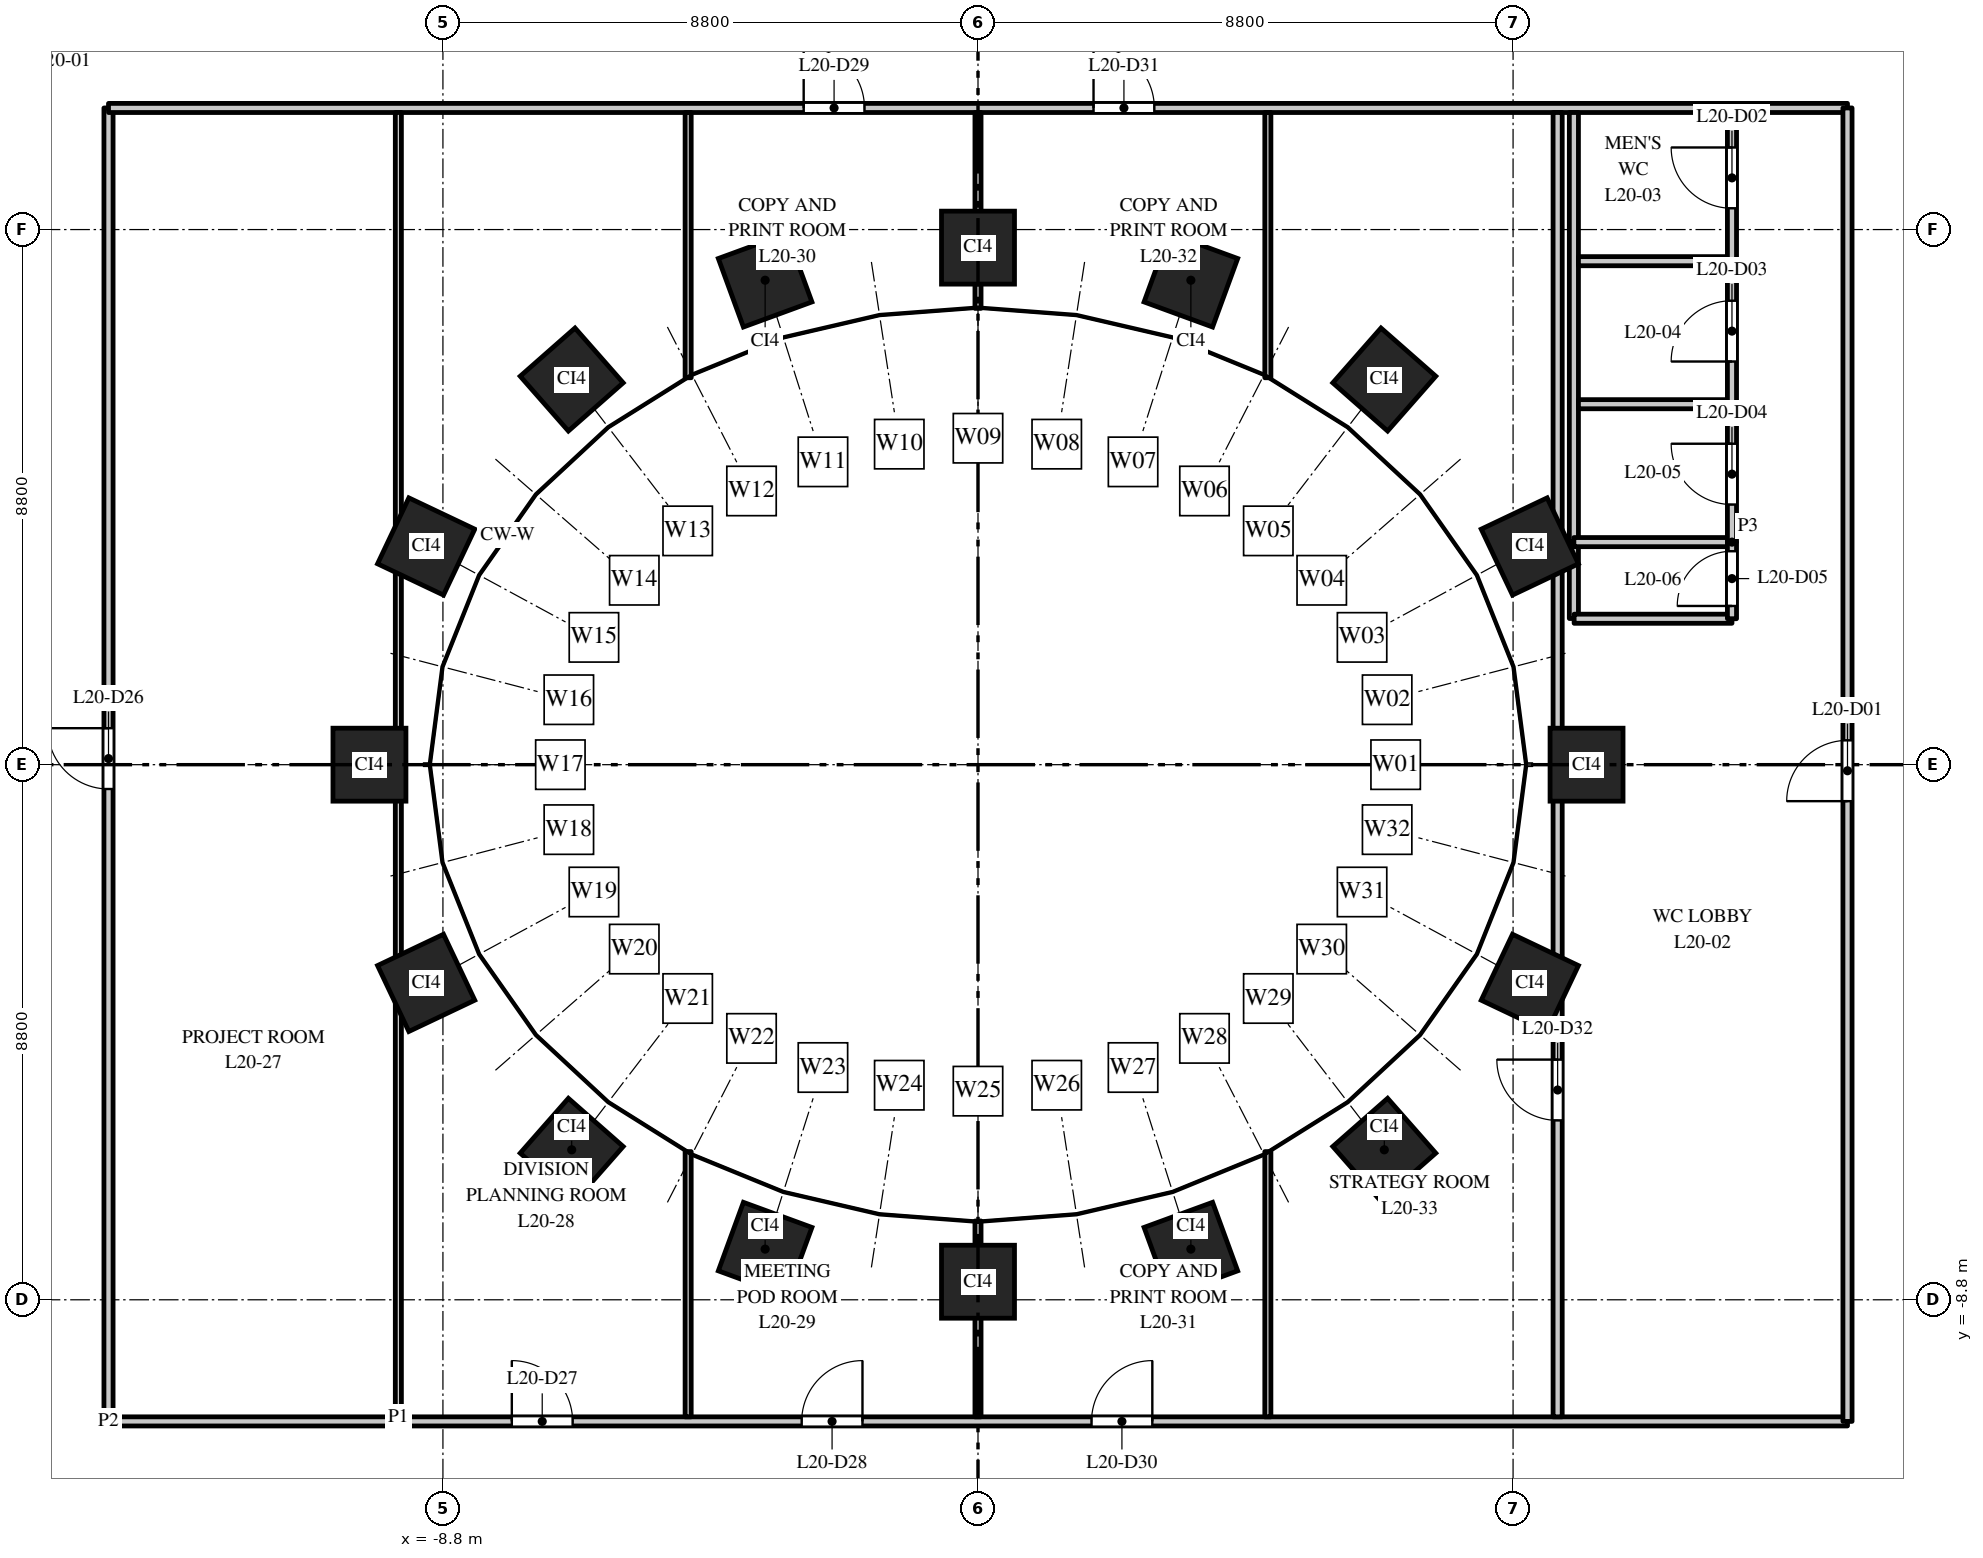
"""IFC4 building model, lengths in metres.
Left out: names, types, materials, properties, quantities, classifications, styles, units other than length and angle.
Written with IfcOpenShell. Run it as: python <this file> out.ifc"""

import sys

from ifc_helpers import new_model, si_unit, direction, frame, frame_2d, origin, origin_2d, place, context, subcontext, project, spatial, rectangle, extrude, element, fill, save


model = new_model("IFC4")
c1 = context("Model", 3, precision=1e-05, world=origin(), true_north=direction((0.0, 1.0)))
c2 = subcontext(c1, "Body", "Model", "MODEL_VIEW")
j1 = project(units=[si_unit("LENGTHUNIT", "METRE"), si_unit("PLANEANGLEUNIT", "RADIAN")], contexts=[c1])
p1 = place(None, origin())
s1 = spatial("IfcSite", under=j1, at=p1, CompositionType="ELEMENT")
p2 = place(p1, origin())
s2 = spatial("IfcBuilding", under=s1, at=p2, CompositionType="ELEMENT")
p3 = place(p2, frame((0.0, 0.0, 92.0)))
s3 = spatial("IfcBuildingStorey", under=s2, at=p3, CompositionType="ELEMENT", Elevation=92.0)
for number, where, z_axis, x_axis in (
    (1, (10.008, 0.0, 0.0), (0.0, 0.0, 1.0), (0.0, 1.0, 0.0)),
    (2, (9.076, 3.588, 0.0), (0.0, 0.0, 1.0), (-0.429, 0.903, 0.0)),
    (3, (6.682, 6.334, 0.0), (0.0, 0.0, 1.0), (-0.751, 0.66, 0.0)),
    (4, (3.501, 7.967, 0.0), (0.0, 0.0, 1.0), (-0.939, 0.344, 0.0)),
    (5, (0.0, 8.503, 0.0), (0.0, 0.0, 1.0), (-1.0, 0.0, 0.0)),
    (6, (-3.501, 7.967, 0.0), (0.0, 0.0, 1.0), (-0.939, -0.344, 0.0)),
    (7, (-6.682, 6.334, 0.0), (0.0, 0.0, 1.0), (-0.751, -0.66, 0.0)),
    (8, (-9.076, 3.588, 0.0), (0.0, 0.0, 1.0), (-0.429, -0.903, 0.0)),
    (9, (-10.008, 0.0, 0.0), (0.0, 0.0, 1.0), (0.0, -1.0, 0.0)),
    (10, (-9.076, -3.588, 0.0), (0.0, 0.0, 1.0), (0.429, -0.903, 0.0)),
    (11, (-6.682, -6.334, 0.0), (0.0, 0.0, 1.0), (0.751, -0.66, 0.0)),
    (12, (-3.501, -7.967, 0.0), (0.0, 0.0, 1.0), (0.939, -0.344, 0.0)),
    (13, (0.0, -8.503, 0.0), (0.0, 0.0, 1.0), (1.0, 0.0, 0.0)),
    (14, (3.501, -7.967, 0.0), (0.0, 0.0, 1.0), (0.939, 0.344, 0.0)),
    (15, (6.682, -6.334, 0.0), (0.0, 0.0, 1.0), (0.751, 0.66, 0.0)),
    (16, (9.076, -3.588, 0.0), (0.0, 0.0, 1.0), (0.429, 0.903, 0.0)),
):
    element("IfcColumn", number, at=place(p3, frame(where, z_axis=z_axis, x_axis=x_axis)), inside=s3, PredefinedType="COLUMN", context=c2, shape_type="SweptSolid", body=[
        extrude(rectangle(XDim=1.2, YDim=1.2, at=origin_2d()), origin(), (0.0, 0.0, 1.0), 4.0),
    ])
p4 = place(p3, frame((-14.3, -10.8, 0.0), z_axis=(0.0, 0.0, 1.0), x_axis=(0.0, 1.0, 0.0)))
e17 = element("IfcWall", 17, at=p4, inside=s3, PredefinedType="PARTITIONING", context=c2, shape_type="SweptSolid", body=[
    extrude(rectangle(XDim=21.6, YDim=0.15, at=frame_2d((10.8, 0.0))), origin(), (0.0, 0.0, 1.0), 2.75),
])
p5 = place(p4, frame((10.4, 0.0, 0.0)))
e18 = element("IfcOpeningElement", 18, at=p5, cuts=e17, PredefinedType="OPENING", context=c2, shape_type="SweptSolid", body=[
    extrude(rectangle(XDim=1.0, YDim=2.1, at=frame_2d((0.5, 1.05))), frame((0.0, 0.085, 0.0), z_axis=(0.0, -1.0, 0.0), x_axis=(1.0, 0.0, 0.0)), (0.0, 0.0, 1.0), 0.17),
])
p6 = place(p3, frame((-14.3, -10.8, 0.0), z_axis=(0.0, 0.0, 1.0), x_axis=(1.0, 0.0, 0.0)))
e19 = element("IfcWall", 19, at=p6, inside=s3, PredefinedType="PARTITIONING", context=c2, shape_type="SweptSolid", body=[
    extrude(rectangle(XDim=28.6, YDim=0.15, at=frame_2d((14.3, 0.0))), origin(), (0.0, 0.0, 1.0), 2.85),
])
p7 = place(p6, frame((6.633, 0.0, 0.0)))
e20 = element("IfcOpeningElement", 20, at=p7, cuts=e19, PredefinedType="OPENING", context=c2, shape_type="SweptSolid", body=[
    extrude(rectangle(XDim=1.0, YDim=2.1, at=frame_2d((0.5, 1.05))), frame((0.0, 0.085, 0.0), z_axis=(0.0, -1.0, 0.0), x_axis=(1.0, 0.0, 0.0)), (0.0, 0.0, 1.0), 0.17),
])
p8 = place(p6, frame((11.4, 0.0, 0.0)))
e21 = element("IfcOpeningElement", 21, at=p8, cuts=e19, PredefinedType="OPENING", context=c2, shape_type="SweptSolid", body=[
    extrude(rectangle(XDim=1.0, YDim=2.1, at=frame_2d((0.5, 1.05))), frame((0.0, 0.085, 0.0), z_axis=(0.0, -1.0, 0.0), x_axis=(1.0, 0.0, 0.0)), (0.0, 0.0, 1.0), 0.17),
])
p9 = place(p6, frame((16.167, 0.0, 0.0)))
e22 = element("IfcOpeningElement", 22, at=p9, cuts=e19, PredefinedType="OPENING", context=c2, shape_type="SweptSolid", body=[
    extrude(rectangle(XDim=1.0, YDim=2.1, at=frame_2d((0.5, 1.05))), frame((0.0, 0.085, 0.0), z_axis=(0.0, -1.0, 0.0), x_axis=(1.0, 0.0, 0.0)), (0.0, 0.0, 1.0), 0.17),
])
p10 = place(p3, frame((-14.3, 10.8, 0.0), z_axis=(0.0, 0.0, 1.0), x_axis=(1.0, 0.0, 0.0)))
e23 = element("IfcWall", 23, at=p10, inside=s3, PredefinedType="PARTITIONING", context=c2, shape_type="SweptSolid", body=[
    extrude(rectangle(XDim=28.6, YDim=0.15, at=frame_2d((14.3, 0.0))), origin(), (0.0, 0.0, 1.0), 2.85),
])
p11 = place(p10, frame((11.433, 0.0, 0.0)))
e24 = element("IfcOpeningElement", 24, at=p11, cuts=e23, PredefinedType="OPENING", context=c2, shape_type="SweptSolid", body=[
    extrude(rectangle(XDim=1.0, YDim=2.1, at=frame_2d((0.5, 1.05))), frame((0.0, 0.085, 0.0), z_axis=(0.0, -1.0, 0.0), x_axis=(1.0, 0.0, 0.0)), (0.0, 0.0, 1.0), 0.17),
])
p12 = place(p10, frame((16.2, 0.0, 0.0)))
e25 = element("IfcOpeningElement", 25, at=p12, cuts=e23, PredefinedType="OPENING", context=c2, shape_type="SweptSolid", body=[
    extrude(rectangle(XDim=1.0, YDim=2.1, at=frame_2d((0.5, 1.05))), frame((0.0, 0.085, 0.0), z_axis=(0.0, -1.0, 0.0), x_axis=(1.0, 0.0, 0.0)), (0.0, 0.0, 1.0), 0.17),
])
p13 = place(p3, frame((-9.533, -10.725, 0.0), z_axis=(0.0, 0.0, 1.0), x_axis=(0.0, 1.0, 0.0)))
e26 = element("IfcWall", 26, at=p13, inside=s3, PredefinedType="PARTITIONING", context=c2, shape_type="SweptSolid", body=[
    extrude(rectangle(XDim=21.45, YDim=0.1, at=frame_2d((10.725, 0.0))), origin(), (0.0, 0.0, 1.0), 2.75),
])
for number, where, z_axis, x_axis in (
    (27, (-4.767, -10.725, 0.0), (0.0, 0.0, 1.0), (0.0, 1.0, 0.0)),
    (28, (-4.767, 6.363, 0.0), (0.0, 0.0, 1.0), (0.0, 1.0, 0.0)),
):
    element("IfcWall", number, at=place(p3, frame(where, z_axis=z_axis, x_axis=x_axis)), inside=s3, PredefinedType="PARTITIONING", context=c2, shape_type="SweptSolid", body=[
        extrude(rectangle(XDim=4.362, YDim=0.1, at=frame_2d((2.181, 0.0))), origin(), (0.0, 0.0, 1.0), 2.9),
    ])
for number, where, z_axis, x_axis in (
    (29, (0.0, -10.725, 0.0), (0.0, 0.0, 1.0), (0.0, 1.0, 0.0)),
    (30, (0.0, 7.504, 0.0), (0.0, 0.0, 1.0), (0.0, 1.0, 0.0)),
):
    element("IfcWall", number, at=place(p3, frame(where, z_axis=z_axis, x_axis=x_axis)), inside=s3, PredefinedType="PARTITIONING", context=c2, shape_type="SweptSolid", body=[
        extrude(rectangle(XDim=3.221, YDim=0.1, at=frame_2d((1.611, 0.0))), origin(), (0.0, 0.0, 1.0), 3.7),
    ])
for number, where, z_axis, x_axis in (
    (31, (4.767, -10.725, 0.0), (0.0, 0.0, 1.0), (0.0, 1.0, 0.0)),
    (32, (4.767, 6.363, 0.0), (0.0, 0.0, 1.0), (0.0, 1.0, 0.0)),
):
    element("IfcWall", number, at=place(p3, frame(where, z_axis=z_axis, x_axis=x_axis)), inside=s3, PredefinedType="PARTITIONING", context=c2, shape_type="SweptSolid", body=[
        extrude(rectangle(XDim=4.362, YDim=0.1, at=frame_2d((2.181, 0.0))), origin(), (0.0, 0.0, 1.0), 2.85),
    ])
p14 = place(p3, frame((9.533, -10.725, 0.0), z_axis=(0.0, 0.0, 1.0), x_axis=(0.0, 1.0, 0.0)))
e33 = element("IfcWall", 33, at=p14, inside=s3, PredefinedType="PARTITIONING", context=c2, shape_type="SweptSolid", body=[
    extrude(rectangle(XDim=21.45, YDim=0.15, at=frame_2d((10.725, 0.0))), origin(), (0.0, 0.0, 1.0), 2.75),
])
p15 = place(p14, frame((4.875, 0.0, 0.0)))
e34 = element("IfcOpeningElement", 34, at=p15, cuts=e33, PredefinedType="OPENING", context=c2, shape_type="SweptSolid", body=[
    extrude(rectangle(XDim=1.0, YDim=2.1, at=frame_2d((0.5, 1.05))), frame((0.0, 0.085, 0.0), z_axis=(0.0, -1.0, 0.0), x_axis=(1.0, 0.0, 0.0)), (0.0, 0.0, 1.0), 0.17),
])
p16 = place(p3, frame((9.8, 2.404, 0.0), z_axis=(0.0, 0.0, 1.0), x_axis=(0.0, 1.0, 0.0)))
e35 = element("IfcWall", 35, at=p16, inside=s3, PredefinedType="PARTITIONING", context=c2, shape_type="SweptSolid", body=[
    extrude(rectangle(XDim=1.256, YDim=0.15, at=frame_2d((0.628, 0.0))), origin(), (0.0, 0.0, 1.0), 3.7),
])
p17 = place(p3, frame((9.8, 3.66, 0.0), z_axis=(0.0, 0.0, 1.0), x_axis=(0.0, 1.0, 0.0)))
e36 = element("IfcWall", 36, at=p17, inside=s3, PredefinedType="PARTITIONING", context=c2, shape_type="SweptSolid", body=[
    extrude(rectangle(XDim=7.065, YDim=0.15, at=frame_2d((3.533, 0.0))), origin(), (0.0, 0.0, 1.0), 2.75),
])
p18 = place(p3, frame((9.8, 3.66, 0.0), z_axis=(0.0, 0.0, 1.0), x_axis=(1.0, 0.0, 0.0)))
e37 = element("IfcWall", 37, at=p18, inside=s3, PredefinedType="PARTITIONING", context=c2, shape_type="SweptSolid", body=[
    extrude(rectangle(XDim=2.6, YDim=0.15, at=frame_2d((1.3, 0.0))), origin(), (0.0, 0.0, 1.0), 3.7),
])
p19 = place(p3, frame((9.875, 5.928, 0.0), z_axis=(0.0, 0.0, 1.0), x_axis=(1.0, 0.0, 0.0)))
e38 = element("IfcWall", 38, at=p19, inside=s3, PredefinedType="PARTITIONING", context=c2, shape_type="SweptSolid", body=[
    extrude(rectangle(XDim=2.45, YDim=0.15, at=frame_2d((1.225, 0.0))), origin(), (0.0, 0.0, 1.0), 2.75),
])
p20 = place(p3, frame((9.875, 8.28, 0.0), z_axis=(0.0, 0.0, 1.0), x_axis=(1.0, 0.0, 0.0)))
e39 = element("IfcWall", 39, at=p20, inside=s3, PredefinedType="PARTITIONING", context=c2, shape_type="SweptSolid", body=[
    extrude(rectangle(XDim=2.45, YDim=0.15, at=frame_2d((1.225, 0.0))), origin(), (0.0, 0.0, 1.0), 3.7),
])
p21 = place(p3, frame((9.804, 2.4, 0.0), z_axis=(0.0, 0.0, 1.0), x_axis=(1.0, 0.0, 0.0)))
e40 = element("IfcWall", 40, at=p21, inside=s3, PredefinedType="PARTITIONING", context=c2, shape_type="SweptSolid", body=[
    extrude(rectangle(XDim=2.596, YDim=0.15, at=frame_2d((1.298, 0.0))), origin(), (0.0, 0.0, 1.0), 3.7),
])
p22 = place(p3, frame((12.4, 2.4, 0.0), z_axis=(0.0, 0.0, 1.0), x_axis=(0.0, 1.0, 0.0)))
e41 = element("IfcWall", 41, at=p22, inside=s3, PredefinedType="PARTITIONING", context=c2, shape_type="SweptSolid", body=[
    extrude(rectangle(XDim=1.26, YDim=0.15, at=frame_2d((0.63, 0.0))), origin(), (0.0, 0.0, 1.0), 3.7),
])
p23 = place(p22, frame((0.21, 0.0, 0.0)))
e42 = element("IfcOpeningElement", 42, at=p23, cuts=e41, PredefinedType="OPENING", context=c2, shape_type="SweptSolid", body=[
    extrude(rectangle(XDim=0.9, YDim=2.1, at=frame_2d((0.45, 1.05))), frame((0.0, 0.085, 0.0), z_axis=(0.0, -1.0, 0.0), x_axis=(1.0, 0.0, 0.0)), (0.0, 0.0, 1.0), 0.17),
])
p24 = place(p3, frame((12.4, 3.66, 0.0), z_axis=(0.0, 0.0, 1.0), x_axis=(0.0, 1.0, 0.0)))
e43 = element("IfcWall", 43, at=p24, inside=s3, PredefinedType="PARTITIONING", context=c2, shape_type="SweptSolid", body=[
    extrude(rectangle(XDim=7.065, YDim=0.15, at=frame_2d((3.533, 0.0))), origin(), (0.0, 0.0, 1.0), 2.75),
])
p25 = place(p24, frame((5.49, 0.0, 0.0)))
e44 = element("IfcOpeningElement", 44, at=p25, cuts=e43, PredefinedType="OPENING", context=c2, shape_type="SweptSolid", body=[
    extrude(rectangle(XDim=1.0, YDim=2.1, at=frame_2d((0.5, 1.05))), frame((0.0, 0.085, 0.0), z_axis=(0.0, -1.0, 0.0), x_axis=(1.0, 0.0, 0.0)), (0.0, 0.0, 1.0), 0.17),
])
p26 = place(p24, frame((2.97, 0.0, 0.0)))
e45 = element("IfcOpeningElement", 45, at=p26, cuts=e43, PredefinedType="OPENING", context=c2, shape_type="SweptSolid", body=[
    extrude(rectangle(XDim=1.0, YDim=2.1, at=frame_2d((0.5, 1.05))), frame((0.0, 0.085, 0.0), z_axis=(0.0, -1.0, 0.0), x_axis=(1.0, 0.0, 0.0)), (0.0, 0.0, 1.0), 0.17),
])
p27 = place(p24, frame((0.618, 0.0, 0.0)))
e46 = element("IfcOpeningElement", 46, at=p27, cuts=e43, PredefinedType="OPENING", context=c2, shape_type="SweptSolid", body=[
    extrude(rectangle(XDim=1.0, YDim=2.1, at=frame_2d((0.5, 1.05))), frame((0.0, 0.085, 0.0), z_axis=(0.0, -1.0, 0.0), x_axis=(1.0, 0.0, 0.0)), (0.0, 0.0, 1.0), 0.17),
])
p28 = place(p3, frame((14.3, -10.8, 0.0), z_axis=(0.0, 0.0, 1.0), x_axis=(0.0, 1.0, 0.0)))
e47 = element("IfcWall", 47, at=p28, inside=s3, PredefinedType="PARTITIONING", context=c2, shape_type="SweptSolid", body=[
    extrude(rectangle(XDim=21.6, YDim=0.15, at=frame_2d((10.8, 0.0))), origin(), (0.0, 0.0, 1.0), 2.75),
])
p29 = place(p28, frame((10.2, 0.0, 0.0)))
e48 = element("IfcOpeningElement", 48, at=p29, cuts=e47, PredefinedType="OPENING", context=c2, shape_type="SweptSolid", body=[
    extrude(rectangle(XDim=1.0, YDim=2.1, at=frame_2d((0.5, 1.05))), frame((0.0, 0.085, 0.0), z_axis=(0.0, -1.0, 0.0), x_axis=(1.0, 0.0, 0.0)), (0.0, 0.0, 1.0), 0.17),
])
p30 = place(p29, origin())
e49 = element("IfcDoor", 49, at=p30, inside=s3, OperationType="SINGLE_SWING_LEFT", PredefinedType="DOOR", context=c2, shape_type="SweptSolid", body=[
    extrude(rectangle(XDim=1.0, YDim=2.1, at=frame_2d((0.5, 1.05))), frame((0.0, 0.025, 0.0), z_axis=(0.0, -1.0, 0.0), x_axis=(1.0, 0.0, 0.0)), (0.0, 0.0, 1.0), 0.05),
])
fill(e48, e49)
p31 = place(p25, origin())
e50 = element("IfcDoor", 50, at=p31, inside=s3, OperationType="SINGLE_SWING_RIGHT", PredefinedType="DOOR", context=c2, shape_type="SweptSolid", body=[
    extrude(rectangle(XDim=1.0, YDim=2.1, at=frame_2d((0.5, 1.05))), frame((0.0, 0.025, 0.0), z_axis=(0.0, -1.0, 0.0), x_axis=(1.0, 0.0, 0.0)), (0.0, 0.0, 1.0), 0.05),
])
fill(e44, e50)
p32 = place(p26, origin())
e51 = element("IfcDoor", 51, at=p32, inside=s3, OperationType="SINGLE_SWING_LEFT", PredefinedType="DOOR", context=c2, shape_type="SweptSolid", body=[
    extrude(rectangle(XDim=1.0, YDim=2.1, at=frame_2d((0.5, 1.05))), frame((0.0, 0.025, 0.0), z_axis=(0.0, -1.0, 0.0), x_axis=(1.0, 0.0, 0.0)), (0.0, 0.0, 1.0), 0.05),
])
fill(e45, e51)
p33 = place(p27, origin())
e52 = element("IfcDoor", 52, at=p33, inside=s3, OperationType="SINGLE_SWING_RIGHT", PredefinedType="DOOR", context=c2, shape_type="SweptSolid", body=[
    extrude(rectangle(XDim=1.0, YDim=2.1, at=frame_2d((0.5, 1.05))), frame((0.0, 0.025, 0.0), z_axis=(0.0, -1.0, 0.0), x_axis=(1.0, 0.0, 0.0)), (0.0, 0.0, 1.0), 0.05),
])
fill(e46, e52)
p34 = place(p23, origin())
e53 = element("IfcDoor", 53, at=p34, inside=s3, OperationType="SINGLE_SWING_LEFT", PredefinedType="DOOR", context=c2, shape_type="SweptSolid", body=[
    extrude(rectangle(XDim=0.9, YDim=2.1, at=frame_2d((0.45, 1.05))), frame((0.0, 0.025, 0.0), z_axis=(0.0, -1.0, 0.0), x_axis=(1.0, 0.0, 0.0)), (0.0, 0.0, 1.0), 0.05),
])
fill(e42, e53)
p35 = place(p5, origin())
e54 = element("IfcDoor", 54, at=p35, inside=s3, OperationType="SINGLE_SWING_RIGHT", PredefinedType="DOOR", context=c2, shape_type="SweptSolid", body=[
    extrude(rectangle(XDim=1.0, YDim=2.1, at=frame_2d((0.5, 1.05))), frame((0.0, 0.025, 0.0), z_axis=(0.0, -1.0, 0.0), x_axis=(1.0, 0.0, 0.0)), (0.0, 0.0, 1.0), 0.05),
])
fill(e18, e54)
p36 = place(p7, origin())
e55 = element("IfcDoor", 55, at=p36, inside=s3, OperationType="SINGLE_SWING_LEFT", PredefinedType="DOOR", context=c2, shape_type="SweptSolid", body=[
    extrude(rectangle(XDim=1.0, YDim=2.1, at=frame_2d((0.5, 1.05))), frame((0.0, 0.025, 0.0), z_axis=(0.0, -1.0, 0.0), x_axis=(1.0, 0.0, 0.0)), (0.0, 0.0, 1.0), 0.05),
])
fill(e20, e55)
p37 = place(p8, origin())
e56 = element("IfcDoor", 56, at=p37, inside=s3, OperationType="SINGLE_SWING_RIGHT", PredefinedType="DOOR", context=c2, shape_type="SweptSolid", body=[
    extrude(rectangle(XDim=1.0, YDim=2.1, at=frame_2d((0.5, 1.05))), frame((0.0, 0.025, 0.0), z_axis=(0.0, -1.0, 0.0), x_axis=(1.0, 0.0, 0.0)), (0.0, 0.0, 1.0), 0.05),
])
fill(e21, e56)
p38 = place(p11, origin())
e57 = element("IfcDoor", 57, at=p38, inside=s3, OperationType="SINGLE_SWING_LEFT", PredefinedType="DOOR", context=c2, shape_type="SweptSolid", body=[
    extrude(rectangle(XDim=1.0, YDim=2.1, at=frame_2d((0.5, 1.05))), frame((0.0, 0.025, 0.0), z_axis=(0.0, -1.0, 0.0), x_axis=(1.0, 0.0, 0.0)), (0.0, 0.0, 1.0), 0.05),
])
fill(e24, e57)
p39 = place(p9, origin())
e58 = element("IfcDoor", 58, at=p39, inside=s3, OperationType="SINGLE_SWING_RIGHT", PredefinedType="DOOR", context=c2, shape_type="SweptSolid", body=[
    extrude(rectangle(XDim=1.0, YDim=2.1, at=frame_2d((0.5, 1.05))), frame((0.0, 0.025, 0.0), z_axis=(0.0, -1.0, 0.0), x_axis=(1.0, 0.0, 0.0)), (0.0, 0.0, 1.0), 0.05),
])
fill(e22, e58)
p40 = place(p12, origin())
e59 = element("IfcDoor", 59, at=p40, inside=s3, OperationType="SINGLE_SWING_LEFT", PredefinedType="DOOR", context=c2, shape_type="SweptSolid", body=[
    extrude(rectangle(XDim=1.0, YDim=2.1, at=frame_2d((0.5, 1.05))), frame((0.0, 0.025, 0.0), z_axis=(0.0, -1.0, 0.0), x_axis=(1.0, 0.0, 0.0)), (0.0, 0.0, 1.0), 0.05),
])
fill(e25, e59)
p41 = place(p15, origin())
e60 = element("IfcDoor", 60, at=p41, inside=s3, OperationType="SINGLE_SWING_RIGHT", PredefinedType="DOOR", context=c2, shape_type="SweptSolid", body=[
    extrude(rectangle(XDim=1.0, YDim=2.1, at=frame_2d((0.5, 1.05))), frame((0.0, 0.025, 0.0), z_axis=(0.0, -1.0, 0.0), x_axis=(1.0, 0.0, 0.0)), (0.0, 0.0, 1.0), 0.05),
])
fill(e34, e60)
save(model, sys.argv[1])
